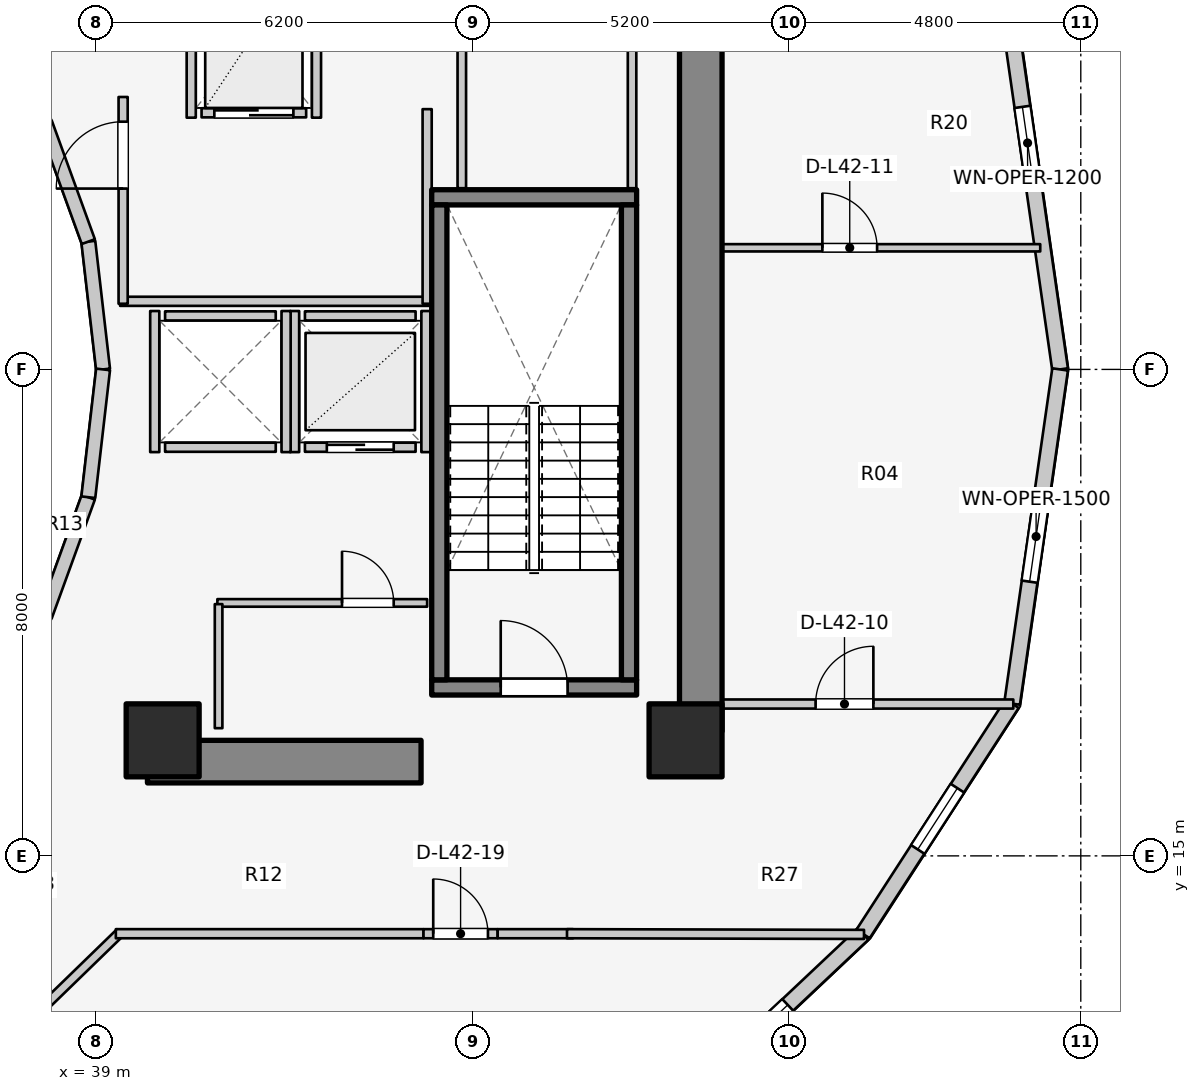
"""IFC4 building model, lengths in metres.
Left out: names, types, materials, properties, quantities, classifications, styles, units other than length and angle.
Written with IfcOpenShell. Run it as: python <this file> out.ifc"""

import sys

from ifc_helpers import new_model, si_unit, direction, frame, frame_2d, origin, origin_2d, place, context, subcontext, project, spatial, rectangle, extrude, element, fill, save


model = new_model("IFC4")
c1 = context("Model", 3, precision=1e-05, world=origin(), true_north=direction((0.0, 1.0)))
c2 = subcontext(c1, "Body", "Model", "MODEL_VIEW")
j1 = project(units=[si_unit("LENGTHUNIT", "METRE"), si_unit("PLANEANGLEUNIT", "RADIAN")], contexts=[c1])
p1 = place(None, origin())
s1 = spatial("IfcSite", under=j1, at=p1, CompositionType="ELEMENT")
p2 = place(p1, origin())
s2 = spatial("IfcBuilding", under=s1, at=p2, CompositionType="ELEMENT")
p3 = place(p2, frame((0.0, 0.0, 140.5)))
s3 = spatial("IfcBuildingStorey", under=s2, at=p3, CompositionType="ELEMENT", Elevation=140.5)
p4 = place(p3, frame((48.95, 17.05, 0.0), z_axis=(0.0, 0.0, 1.0), x_axis=(0.0, 1.0, 0.0)))
e1 = element("IfcWall", 1, at=p4, inside=s3, PredefinedType="SHEAR", context=c2, shape_type="SweptSolid", body=[
    extrude(rectangle(XDim=12.8, YDim=0.7, at=frame_2d((6.4, 0.0))), origin(), (0.0, 0.0, 1.0), 3.1),
])
p5 = place(p3, frame((39.85, 16.55, 0.0), z_axis=(0.0, 0.0, 1.0), x_axis=(1.0, 0.0, 0.0)))
e2 = element("IfcWall", 2, at=p5, inside=s3, PredefinedType="SHEAR", context=c2, shape_type="SweptSolid", body=[
    extrude(rectangle(XDim=4.5, YDim=0.7, at=frame_2d((2.25, 0.0))), origin(), (0.0, 0.0, 1.0), 3.1),
])
p6 = place(p3, frame((44.525, 17.77, 0.0), z_axis=(0.0, 0.0, 1.0), x_axis=(1.0, 0.0, 0.0)))
e3 = element("IfcWall", 3, at=p6, inside=s3, PredefinedType="SOLIDWALL", context=c2, shape_type="SweptSolid", body=[
    extrude(rectangle(XDim=3.37, YDim=0.25, at=frame_2d((1.685, 0.0))), origin(), (0.0, 0.0, 1.0), 3.1),
])
p7 = place(p6, frame((1.135, 0.0, 0.0)))
e4 = element("IfcOpeningElement", 4, at=p7, cuts=e3, PredefinedType="OPENING", context=c2, shape_type="SweptSolid", body=[
    extrude(rectangle(XDim=1.1, YDim=2.1, at=frame_2d((0.55, 1.05))), frame((0.0, 0.135, 0.0), z_axis=(0.0, -1.0, 0.0), x_axis=(1.0, 0.0, 0.0)), (0.0, 0.0, 1.0), 0.27),
])
p8 = place(p3, frame((44.525, 25.83, 0.0), z_axis=(0.0, 0.0, 1.0), x_axis=(1.0, 0.0, 0.0)))
e5 = element("IfcWall", 5, at=p8, inside=s3, PredefinedType="SOLIDWALL", context=c2, shape_type="SweptSolid", body=[
    extrude(rectangle(XDim=3.37, YDim=0.25, at=frame_2d((1.685, 0.0))), origin(), (0.0, 0.0, 1.0), 3.1),
])
for number, where, z_axis, x_axis in (
    (6, (44.65, 17.895, 0.0), (0.0, 0.0, 1.0), (0.0, 1.0, 0.0)),
    (7, (47.77, 17.895, 0.0), (0.0, 0.0, 1.0), (0.0, 1.0, 0.0)),
):
    element("IfcWall", number, at=place(p3, frame(where, z_axis=z_axis, x_axis=x_axis)), inside=s3, PredefinedType="SOLIDWALL", context=c2, shape_type="SweptSolid", body=[
        extrude(rectangle(XDim=7.81, YDim=0.25, at=frame_2d((3.905, 0.0))), origin(), (0.0, 0.0, 1.0), 3.1),
    ])
for number, where, z_axis, x_axis in (
    (8, (40.1, 16.9, 0.0), (0.0, 0.0, 1.0), (1.0, 0.0, 0.0)),
    (9, (48.7, 16.9, 0.0), (0.0, 0.0, 1.0), (1.0, 0.0, 0.0)),
):
    element("IfcColumn", number, at=place(p3, frame(where, z_axis=z_axis, x_axis=x_axis)), inside=s3, PredefinedType="COLUMN", context=c2, shape_type="SweptSolid", body=[
        extrude(rectangle(XDim=1.2, YDim=1.2, at=origin_2d()), origin(), (0.0, 0.0, 1.0), 3.1),
    ])
p9 = place(p3, frame((39.12, 23.0, 0.0), z_axis=(0.0, 0.0, 1.0), x_axis=(-0.114711713601, 0.993398823617, 0.0)))
e10 = element("IfcWall", 10, at=p9, inside=s3, PredefinedType="STANDARD", context=c2, shape_type="SweptSolid", body=[
    extrude(rectangle(XDim=2.115, YDim=0.23, at=frame_2d((1.058, 0.0))), origin(), (0.0, 0.0, 1.0), 2.56),
])
for number, where, z_axis, x_axis in (
    (11, (38.877, 25.102, 0.0), (0.0, 0.0, 1.0), (-0.341, 0.94, 0.0)),
    (12, (38.166, 18.94, 0.0), (0.0, 0.0, 1.0), (0.341, 0.94, 0.0)),
):
    element("IfcWall", number, at=place(p3, frame(where, z_axis=z_axis, x_axis=x_axis)), inside=s3, PredefinedType="STANDARD", context=c2, shape_type="SweptSolid", body=[
        extrude(rectangle(XDim=2.084, YDim=0.23, at=frame_2d((1.042, 0.0))), origin(), (0.0, 0.0, 1.0), 2.56),
    ])
p10 = place(p3, frame((38.877, 20.898, 0.0), z_axis=(0.0, 0.0, 1.0), x_axis=(0.114711713601, 0.993398823617, 0.0)))
e13 = element("IfcWall", 13, at=p10, inside=s3, PredefinedType="STANDARD", context=c2, shape_type="SweptSolid", body=[
    extrude(rectangle(XDim=2.115, YDim=0.23, at=frame_2d((1.058, 0.0))), origin(), (0.0, 0.0, 1.0), 2.56),
])
p11 = place(p3, frame((54.86, 23.0, 0.0), z_axis=(0.0, 0.0, 1.0), x_axis=(-0.142227632286, 0.989833976288, 0.0)))
e14 = element("IfcWall", 14, at=p11, inside=s3, PredefinedType="STANDARD", context=c2, shape_type="SweptSolid", body=[
    extrude(rectangle(XDim=5.553, YDim=0.26, at=frame_2d((2.776, 0.0))), origin(), (0.0, 0.0, 1.0), 2.57),
])
p12 = place(p11, frame((3.162, 0.0, 0.75)))
e15 = element("IfcOpeningElement", 15, at=p12, cuts=e14, PredefinedType="OPENING", context=c2, shape_type="SweptSolid", body=[
    extrude(rectangle(XDim=1.2, YDim=1.5, at=frame_2d((0.6, 0.75))), frame((0.0, 0.14, 0.0), z_axis=(0.0, -1.0, 0.0), x_axis=(1.0, 0.0, 0.0)), (0.0, 0.0, 1.0), 0.28),
])
p13 = place(p3, frame((48.269, 10.559, 0.0), z_axis=(0.0, 0.0, 1.0), x_axis=(0.727667301037, 0.68593024354, 0.0)))
e16 = element("IfcWall", 16, at=p13, inside=s3, PredefinedType="STANDARD", context=c2, shape_type="SweptSolid", body=[
    extrude(rectangle(XDim=4.604, YDim=0.26, at=frame_2d((2.302, 0.0))), origin(), (0.0, 0.0, 1.0), 1.22),
])
p14 = place(p13, frame((1.702, 0.0, 0.15)))
e17 = element("IfcOpeningElement", 17, at=p14, cuts=e16, PredefinedType="OPENING", context=c2, shape_type="SweptSolid", body=[
    extrude(rectangle(XDim=1.2, YDim=0.9, at=frame_2d((0.6, 0.45))), frame((0.0, 0.14, 0.0), z_axis=(0.0, -1.0, 0.0), x_axis=(1.0, 0.0, 0.0)), (0.0, 0.0, 1.0), 0.28),
])
p15 = place(p3, frame((51.619, 13.716, 0.0), z_axis=(0.0, 0.0, 1.0), x_axis=(0.543358984534, 0.839500454989, 0.0)))
e18 = element("IfcWall", 18, at=p15, inside=s3, PredefinedType="STANDARD", context=c2, shape_type="SweptSolid", body=[
    extrude(rectangle(XDim=4.511, YDim=0.26, at=frame_2d((2.256, 0.0))), origin(), (0.0, 0.0, 1.0), 1.22),
])
p16 = place(p15, frame((1.656, 0.0, 0.15)))
e19 = element("IfcOpeningElement", 19, at=p16, cuts=e18, PredefinedType="OPENING", context=c2, shape_type="SweptSolid", body=[
    extrude(rectangle(XDim=1.2, YDim=0.9, at=frame_2d((0.6, 0.45))), frame((0.0, 0.14, 0.0), z_axis=(0.0, -1.0, 0.0), x_axis=(1.0, 0.0, 0.0)), (0.0, 0.0, 1.0), 0.28),
])
p17 = place(p3, frame((54.07, 17.503, 0.0), z_axis=(0.0, 0.0, 1.0), x_axis=(0.142227632286, 0.989833976288, 0.0)))
e20 = element("IfcWall", 20, at=p17, inside=s3, PredefinedType="STANDARD", context=c2, shape_type="SweptSolid", body=[
    extrude(rectangle(XDim=5.553, YDim=0.26, at=frame_2d((2.776, 0.0))), origin(), (0.0, 0.0, 1.0), 2.57),
])
p18 = place(p17, frame((2.027, 0.0, 0.75)))
e21 = element("IfcOpeningElement", 21, at=p18, cuts=e20, PredefinedType="OPENING", context=c2, shape_type="SweptSolid", body=[
    extrude(rectangle(XDim=1.5, YDim=1.6, at=frame_2d((0.75, 0.8))), frame((0.0, 0.14, 0.0), z_axis=(0.0, -1.0, 0.0), x_axis=(1.0, 0.0, 0.0)), (0.0, 0.0, 1.0), 0.28),
])
p19 = place(p3, frame((42.44, 21.72, 0.0), z_axis=(0.0, 0.0, 1.0), x_axis=(1.0, 0.0, 0.0)))
e22 = element("IfcWall", 22, at=p19, inside=s3, PredefinedType="SOLIDWALL", context=c2, shape_type="SweptSolid", body=[
    extrude(rectangle(XDim=1.82, YDim=0.15, at=frame_2d((0.91, 0.0))), origin(), (0.0, 0.0, 1.0), 2.575),
])
p20 = place(p19, frame((0.36, 0.0, 0.0)))
e23 = element("IfcOpeningElement", 23, at=p20, cuts=e22, PredefinedType="OPENING", context=c2, shape_type="SweptSolid", body=[
    extrude(rectangle(XDim=1.1, YDim=2.1, at=frame_2d((0.55, 1.05))), frame((0.0, 0.085, 0.0), z_axis=(0.0, -1.0, 0.0), x_axis=(1.0, 0.0, 0.0)), (0.0, 0.0, 1.0), 0.17),
])
p21 = place(p3, frame((42.44, 23.88, 0.0), z_axis=(0.0, 0.0, 1.0), x_axis=(1.0, 0.0, 0.0)))
e24 = element("IfcWall", 24, at=p21, inside=s3, PredefinedType="SOLIDWALL", context=c2, shape_type="SweptSolid", body=[
    extrude(rectangle(XDim=1.82, YDim=0.15, at=frame_2d((0.91, 0.0))), origin(), (0.0, 0.0, 1.0), 2.575),
])
for number, where, z_axis, x_axis in (
    (25, (42.27, 21.64, 0.0), (0.0, 0.0, 1.0), (0.0, 1.0, 0.0)),
    (26, (44.43, 21.64, 0.0), (0.0, 0.0, 1.0), (0.0, 1.0, 0.0)),
):
    element("IfcWall", number, at=place(p3, frame(where, z_axis=z_axis, x_axis=x_axis)), inside=s3, PredefinedType="SOLIDWALL", context=c2, shape_type="SweptSolid", body=[
        extrude(rectangle(XDim=2.32, YDim=0.15, at=frame_2d((1.16, 0.0))), origin(), (0.0, 0.0, 1.0), 2.575),
    ])
for number, where, z_axis, x_axis in (
    (27, (40.14, 21.72, 0.0), (0.0, 0.0, 1.0), (1.0, 0.0, 0.0)),
    (28, (40.14, 23.88, 0.0), (0.0, 0.0, 1.0), (1.0, 0.0, 0.0)),
):
    element("IfcWall", number, at=place(p3, frame(where, z_axis=z_axis, x_axis=x_axis)), inside=s3, PredefinedType="SOLIDWALL", context=c2, shape_type="SweptSolid", body=[
        extrude(rectangle(XDim=1.82, YDim=0.15, at=frame_2d((0.91, 0.0))), origin(), (0.0, 0.0, 1.0), 2.12),
    ])
p22 = place(p3, frame((39.97, 21.64, 0.0), z_axis=(0.0, 0.0, 1.0), x_axis=(0.0, 1.0, 0.0)))
e29 = element("IfcWall", 29, at=p22, inside=s3, PredefinedType="SOLIDWALL", context=c2, shape_type="SweptSolid", body=[
    extrude(rectangle(XDim=2.32, YDim=0.15, at=frame_2d((1.16, 0.0))), origin(), (0.0, 0.0, 1.0), 2.12),
])
p23 = place(p3, frame((42.13, 21.64, 0.0), z_axis=(0.0, 0.0, 1.0), x_axis=(0.0, 1.0, 0.0)))
e30 = element("IfcWall", 30, at=p23, inside=s3, PredefinedType="SOLIDWALL", context=c2, shape_type="SweptSolid", body=[
    extrude(rectangle(XDim=2.32, YDim=0.15, at=frame_2d((1.16, 0.0))), origin(), (0.0, 0.0, 1.0), 2.575),
])
p24 = place(p3, frame((40.74, 27.22, 0.0), z_axis=(0.0, 0.0, 1.0), x_axis=(1.0, 0.0, 0.0)))
e31 = element("IfcWall", 31, at=p24, inside=s3, PredefinedType="SOLIDWALL", context=c2, shape_type="SweptSolid", body=[
    extrude(rectangle(XDim=1.72, YDim=0.15, at=frame_2d((0.86, 0.0))), origin(), (0.0, 0.0, 1.0), 2.575),
])
p25 = place(p24, frame((0.21, 0.0, 0.0)))
e32 = element("IfcOpeningElement", 32, at=p25, cuts=e31, PredefinedType="OPENING", context=c2, shape_type="SweptSolid", body=[
    extrude(rectangle(XDim=1.3, YDim=2.1, at=frame_2d((0.65, 1.05))), frame((0.0, 0.085, 0.0), z_axis=(0.0, -1.0, 0.0), x_axis=(1.0, 0.0, 0.0)), (0.0, 0.0, 1.0), 0.17),
])
for number, where, z_axis, x_axis in (
    (33, (40.57, 27.14, 0.0), (0.0, 0.0, 1.0), (0.0, 1.0, 0.0)),
    (34, (42.63, 27.14, 0.0), (0.0, 0.0, 1.0), (0.0, 1.0, 0.0)),
):
    element("IfcWall", number, at=place(p3, frame(where, z_axis=z_axis, x_axis=x_axis)), inside=s3, PredefinedType="SOLIDWALL", context=c2, shape_type="SweptSolid", body=[
        extrude(rectangle(XDim=2.72, YDim=0.15, at=frame_2d((1.36, 0.0))), origin(), (0.0, 0.0, 1.0), 2.575),
    ])
p26 = place(p3, frame((39.4, 24.12, 0.0), z_axis=(0.0, 0.0, 1.0), x_axis=(1.0, 0.0, 0.0)))
e35 = element("IfcWall", 35, at=p26, inside=s3, PredefinedType="PARTITIONING", context=c2, shape_type="SweptSolid", body=[
    extrude(rectangle(XDim=5.08, YDim=0.15, at=frame_2d((2.54, 0.0))), origin(), (0.0, 0.0, 1.0), 2.12),
])
p27 = place(p3, frame((44.45, 24.08, 0.0), z_axis=(0.0, 0.0, 1.0), x_axis=(0.0, 1.0, 0.0)))
e36 = element("IfcWall", 36, at=p27, inside=s3, PredefinedType="PARTITIONING", context=c2, shape_type="SweptSolid", body=[
    extrude(rectangle(XDim=3.2, YDim=0.15, at=frame_2d((1.6, 0.0))), origin(), (0.0, 0.0, 1.0), 2.575),
])
p28 = place(p3, frame((39.45, 24.08, 0.0), z_axis=(0.0, 0.0, 1.0), x_axis=(0.0, 1.0, 0.0)))
e37 = element("IfcWall", 37, at=p28, inside=s3, PredefinedType="PARTITIONING", context=c2, shape_type="SweptSolid", body=[
    extrude(rectangle(XDim=3.4, YDim=0.15, at=frame_2d((1.7, 0.0))), origin(), (0.0, 0.0, 1.0), 2.575),
])
p29 = place(p28, frame((1.894, 0.0, 0.0)))
e38 = element("IfcOpeningElement", 38, at=p29, cuts=e37, PredefinedType="OPENING", context=c2, shape_type="SweptSolid", body=[
    extrude(rectangle(XDim=1.1, YDim=2.1, at=frame_2d((0.55, 1.05))), frame((0.0, 0.085, 0.0), z_axis=(0.0, -1.0, 0.0), x_axis=(1.0, 0.0, 0.0)), (0.0, 0.0, 1.0), 0.17),
])
p30 = place(p3, frame((41.0, 19.16, 0.0), z_axis=(0.0, 0.0, 1.0), x_axis=(1.0, 0.0, 0.0)))
e39 = element("IfcWall", 39, at=p30, inside=s3, PredefinedType="PARTITIONING", context=c2, shape_type="SweptSolid", body=[
    extrude(rectangle(XDim=3.45, YDim=0.125, at=frame_2d((1.725, 0.0))), origin(), (0.0, 0.0, 1.0), 2.12),
])
p31 = place(p30, frame((2.05, 0.0, 0.0)))
e40 = element("IfcOpeningElement", 40, at=p31, cuts=e39, PredefinedType="OPENING", context=c2, shape_type="SweptSolid", body=[
    extrude(rectangle(XDim=0.85, YDim=2.05, at=frame_2d((0.425, 1.025))), frame((0.0, 0.073, 0.0), z_axis=(0.0, -1.0, 0.0), x_axis=(1.0, 0.0, 0.0)), (0.0, 0.0, 1.0), 0.145),
])
p32 = place(p3, frame((41.02, 17.1, 0.0), z_axis=(0.0, 0.0, 1.0), x_axis=(0.0, 1.0, 0.0)))
e41 = element("IfcWall", 41, at=p32, inside=s3, PredefinedType="PARTITIONING", context=c2, shape_type="SweptSolid", body=[
    extrude(rectangle(XDim=2.04, YDim=0.125, at=frame_2d((1.02, 0.0))), origin(), (0.0, 0.0, 1.0), 2.575),
])
for number, where, z_axis, x_axis in (
    (42, (45.02, 25.98, 0.0), (0.0, 0.0, 1.0), (0.0, 1.0, 0.0)),
    (43, (47.82, 25.98, 0.0), (0.0, 0.0, 1.0), (0.0, 1.0, 0.0)),
):
    element("IfcWall", number, at=place(p3, frame(where, z_axis=z_axis, x_axis=x_axis)), inside=s3, PredefinedType="PLUMBINGWALL", context=c2, shape_type="SweptSolid", body=[
        extrude(rectangle(XDim=3.88, YDim=0.14, at=frame_2d((1.94, 0.0))), origin(), (0.0, 0.0, 1.0), 2.575),
    ])
p33 = place(p3, frame((48.95, 17.497, 0.0), z_axis=(0.0, 0.0, 1.0), x_axis=(1.0, 0.0, 0.0)))
e44 = element("IfcWall", 44, at=p33, inside=s3, PredefinedType="PARTITIONING", context=c2, shape_type="SweptSolid", body=[
    extrude(rectangle(XDim=5.14, YDim=0.15, at=frame_2d((2.57, 0.0))), origin(), (0.0, 0.0, 1.0), 2.575),
])
p34 = place(p33, frame((1.889, 0.0, 0.0)))
e45 = element("IfcOpeningElement", 45, at=p34, cuts=e44, PredefinedType="OPENING", context=c2, shape_type="SweptSolid", body=[
    extrude(rectangle(XDim=0.95, YDim=2.1, at=frame_2d((0.475, 1.05))), frame((0.0, 0.085, 0.0), z_axis=(0.0, -1.0, 0.0), x_axis=(1.0, 0.0, 0.0)), (0.0, 0.0, 1.0), 0.17),
])
p35 = place(p3, frame((48.95, 25.0, 0.0), z_axis=(0.0, 0.0, 1.0), x_axis=(1.0, 0.0, 0.0)))
e46 = element("IfcWall", 46, at=p35, inside=s3, PredefinedType="MOVABLE", context=c2, shape_type="SweptSolid", body=[
    extrude(rectangle(XDim=5.583, YDim=0.12, at=frame_2d((2.792, 0.0))), origin(), (0.0, 0.0, 1.0), 2.575),
])
p36 = place(p35, frame((2.0, 0.0, 0.0)))
e47 = element("IfcOpeningElement", 47, at=p36, cuts=e46, PredefinedType="OPENING", context=c2, shape_type="SweptSolid", body=[
    extrude(rectangle(XDim=0.9, YDim=2.1, at=frame_2d((0.45, 1.05))), frame((0.0, 0.07, 0.0), z_axis=(0.0, -1.0, 0.0), x_axis=(1.0, 0.0, 0.0)), (0.0, 0.0, 1.0), 0.14),
])
p37 = place(p3, frame((37.867, 12.251, 0.0), z_axis=(0.0, 0.0, 1.0), x_axis=(0.717419568599, 0.696641344302, 0.0)))
e48 = element("IfcWall", 48, at=p37, inside=s3, PredefinedType="PARTITIONING", context=c2, shape_type="SweptSolid", body=[
    extrude(rectangle(XDim=2.138, YDim=0.15, at=frame_2d((1.069, 0.0))), origin(), (0.0, 0.0, 1.0), 2.019),
])
p38 = place(p3, frame((39.33, 13.72, 0.0), z_axis=(0.0, 0.0, 1.0), x_axis=(1.0, 0.0, 0.0)))
e49 = element("IfcWall", 49, at=p38, inside=s3, PredefinedType="PARTITIONING", context=c2, shape_type="SweptSolid", body=[
    extrude(rectangle(XDim=5.06, YDim=0.15, at=frame_2d((2.53, 0.0))), origin(), (0.0, 0.0, 1.0), 2.019),
])
p39 = place(p3, frame((44.39, 13.72, 0.0), z_axis=(0.0, 0.0, 1.0), x_axis=(1.0, 0.0, 0.0)))
e50 = element("IfcWall", 50, at=p39, inside=s3, PredefinedType="PARTITIONING", context=c2, shape_type="SweptSolid", body=[
    extrude(rectangle(XDim=1.22, YDim=0.15, at=frame_2d((0.61, 0.0))), origin(), (0.0, 0.0, 1.0), 2.575),
])
p40 = place(p39, frame((0.16, 0.0, 0.0)))
e51 = element("IfcOpeningElement", 51, at=p40, cuts=e50, PredefinedType="OPENING", context=c2, shape_type="SweptSolid", body=[
    extrude(rectangle(XDim=0.9, YDim=2.1, at=frame_2d((0.45, 1.05))), frame((0.0, 0.085, 0.0), z_axis=(0.0, -1.0, 0.0), x_axis=(1.0, 0.0, 0.0)), (0.0, 0.0, 1.0), 0.17),
])
p41 = place(p3, frame((45.61, 13.72, 0.0), z_axis=(0.0, 0.0, 1.0), x_axis=(1.0, 0.0, 0.0)))
e52 = element("IfcWall", 52, at=p41, inside=s3, PredefinedType="PARTITIONING", context=c2, shape_type="SweptSolid", body=[
    extrude(rectangle(XDim=1.24, YDim=0.15, at=frame_2d((0.62, 0.0))), origin(), (0.0, 0.0, 1.0), 2.575),
])
p42 = place(p3, frame((46.75, 13.72, 0.0), z_axis=(0.0, 0.0, 1.0), x_axis=(0.999997122315, -0.00239903348, 0.0)))
e53 = element("IfcWall", 53, at=p42, inside=s3, PredefinedType="PARTITIONING", context=c2, shape_type="SweptSolid", body=[
    extrude(rectangle(XDim=4.885, YDim=0.15, at=frame_2d((2.442, 0.0))), origin(), (0.0, 0.0, 1.0), 1.22),
])
p43 = place(p12, origin())
e54 = element("IfcWindow", 54, at=p43, inside=s3, PartitioningType="SINGLE_PANEL", PredefinedType="WINDOW", context=c2, shape_type="SweptSolid", body=[
    extrude(rectangle(XDim=1.2, YDim=1.5, at=frame_2d((0.6, 0.75))), frame((0.0, 0.03, 0.0), z_axis=(0.0, -1.0, 0.0), x_axis=(1.0, 0.0, 0.0)), (0.0, 0.0, 1.0), 0.06),
])
fill(e15, e54)
p44 = place(p14, origin())
e55 = element("IfcWindow", 55, at=p44, inside=s3, PartitioningType="SINGLE_PANEL", PredefinedType="WINDOW", context=c2, shape_type="SweptSolid", body=[
    extrude(rectangle(XDim=1.2, YDim=0.9, at=frame_2d((0.6, 0.45))), frame((0.0, 0.03, 0.0), z_axis=(0.0, -1.0, 0.0), x_axis=(1.0, 0.0, 0.0)), (0.0, 0.0, 1.0), 0.06),
])
fill(e17, e55)
p45 = place(p16, origin())
e56 = element("IfcWindow", 56, at=p45, inside=s3, PartitioningType="SINGLE_PANEL", PredefinedType="WINDOW", context=c2, shape_type="SweptSolid", body=[
    extrude(rectangle(XDim=1.2, YDim=0.9, at=frame_2d((0.6, 0.45))), frame((0.0, 0.03, 0.0), z_axis=(0.0, -1.0, 0.0), x_axis=(1.0, 0.0, 0.0)), (0.0, 0.0, 1.0), 0.06),
])
fill(e19, e56)
p46 = place(p18, origin())
e57 = element("IfcWindow", 57, at=p46, inside=s3, PartitioningType="SINGLE_PANEL", PredefinedType="WINDOW", context=c2, shape_type="SweptSolid", body=[
    extrude(rectangle(XDim=1.5, YDim=1.6, at=frame_2d((0.75, 0.8))), frame((0.0, 0.03, 0.0), z_axis=(0.0, -1.0, 0.0), x_axis=(1.0, 0.0, 0.0)), (0.0, 0.0, 1.0), 0.06),
])
fill(e21, e57)
p47 = place(p7, origin())
e58 = element("IfcDoor", 58, at=p47, inside=s3, OperationType="SINGLE_SWING_LEFT", PredefinedType="DOOR", context=c2, shape_type="SweptSolid", body=[
    extrude(rectangle(XDim=1.1, YDim=2.1, at=frame_2d((0.55, 1.05))), frame((0.0, 0.025, 0.0), z_axis=(0.0, -1.0, 0.0), x_axis=(1.0, 0.0, 0.0)), (0.0, 0.0, 1.0), 0.05),
])
fill(e4, e58)
p48 = place(p20, origin())
e59 = element("IfcDoor", 59, at=p48, inside=s3, OperationType="DOUBLE_DOOR_SLIDING", PredefinedType="DOOR", context=c2, shape_type="SweptSolid", body=[
    extrude(rectangle(XDim=1.1, YDim=2.1, at=frame_2d((0.55, 1.05))), frame((0.0, 0.025, 0.0), z_axis=(0.0, -1.0, 0.0), x_axis=(1.0, 0.0, 0.0)), (0.0, 0.0, 1.0), 0.05),
])
fill(e23, e59)
p49 = place(p25, origin())
e60 = element("IfcDoor", 60, at=p49, inside=s3, OperationType="DOUBLE_DOOR_SLIDING", PredefinedType="DOOR", context=c2, shape_type="SweptSolid", body=[
    extrude(rectangle(XDim=1.3, YDim=2.1, at=frame_2d((0.65, 1.05))), frame((0.0, 0.025, 0.0), z_axis=(0.0, -1.0, 0.0), x_axis=(1.0, 0.0, 0.0)), (0.0, 0.0, 1.0), 0.05),
])
fill(e32, e60)
p50 = place(p29, origin())
e61 = element("IfcDoor", 61, at=p50, inside=s3, OperationType="SINGLE_SWING_LEFT", PredefinedType="DOOR", context=c2, shape_type="SweptSolid", body=[
    extrude(rectangle(XDim=1.1, YDim=2.1, at=frame_2d((0.55, 1.05))), frame((0.0, 0.025, 0.0), z_axis=(0.0, -1.0, 0.0), x_axis=(1.0, 0.0, 0.0)), (0.0, 0.0, 1.0), 0.05),
])
fill(e38, e61)
p51 = place(p31, origin())
e62 = element("IfcDoor", 62, at=p51, inside=s3, OperationType="SINGLE_SWING_LEFT", PredefinedType="DOOR", context=c2, shape_type="SweptSolid", body=[
    extrude(rectangle(XDim=0.85, YDim=2.05, at=frame_2d((0.425, 1.025))), frame((0.0, 0.025, 0.0), z_axis=(0.0, -1.0, 0.0), x_axis=(1.0, 0.0, 0.0)), (0.0, 0.0, 1.0), 0.05),
])
fill(e40, e62)
p52 = place(p34, origin())
e63 = element("IfcDoor", 63, at=p52, inside=s3, OperationType="SINGLE_SWING_RIGHT", PredefinedType="DOOR", context=c2, shape_type="SweptSolid", body=[
    extrude(rectangle(XDim=0.95, YDim=2.1, at=frame_2d((0.475, 1.05))), frame((0.0, 0.025, 0.0), z_axis=(0.0, -1.0, 0.0), x_axis=(1.0, 0.0, 0.0)), (0.0, 0.0, 1.0), 0.05),
])
fill(e45, e63)
p53 = place(p36, origin())
e64 = element("IfcDoor", 64, at=p53, inside=s3, OperationType="SINGLE_SWING_LEFT", PredefinedType="DOOR", context=c2, shape_type="SweptSolid", body=[
    extrude(rectangle(XDim=0.9, YDim=2.1, at=frame_2d((0.45, 1.05))), frame((0.0, 0.025, 0.0), z_axis=(0.0, -1.0, 0.0), x_axis=(1.0, 0.0, 0.0)), (0.0, 0.0, 1.0), 0.05),
])
fill(e47, e64)
p54 = place(p40, origin())
e65 = element("IfcDoor", 65, at=p54, inside=s3, OperationType="SINGLE_SWING_LEFT", PredefinedType="DOOR", context=c2, shape_type="SweptSolid", body=[
    extrude(rectangle(XDim=0.9, YDim=2.1, at=frame_2d((0.45, 1.05))), frame((0.0, 0.025, 0.0), z_axis=(0.0, -1.0, 0.0), x_axis=(1.0, 0.0, 0.0)), (0.0, 0.0, 1.0), 0.05),
])
fill(e51, e65)
save(model, sys.argv[1])
